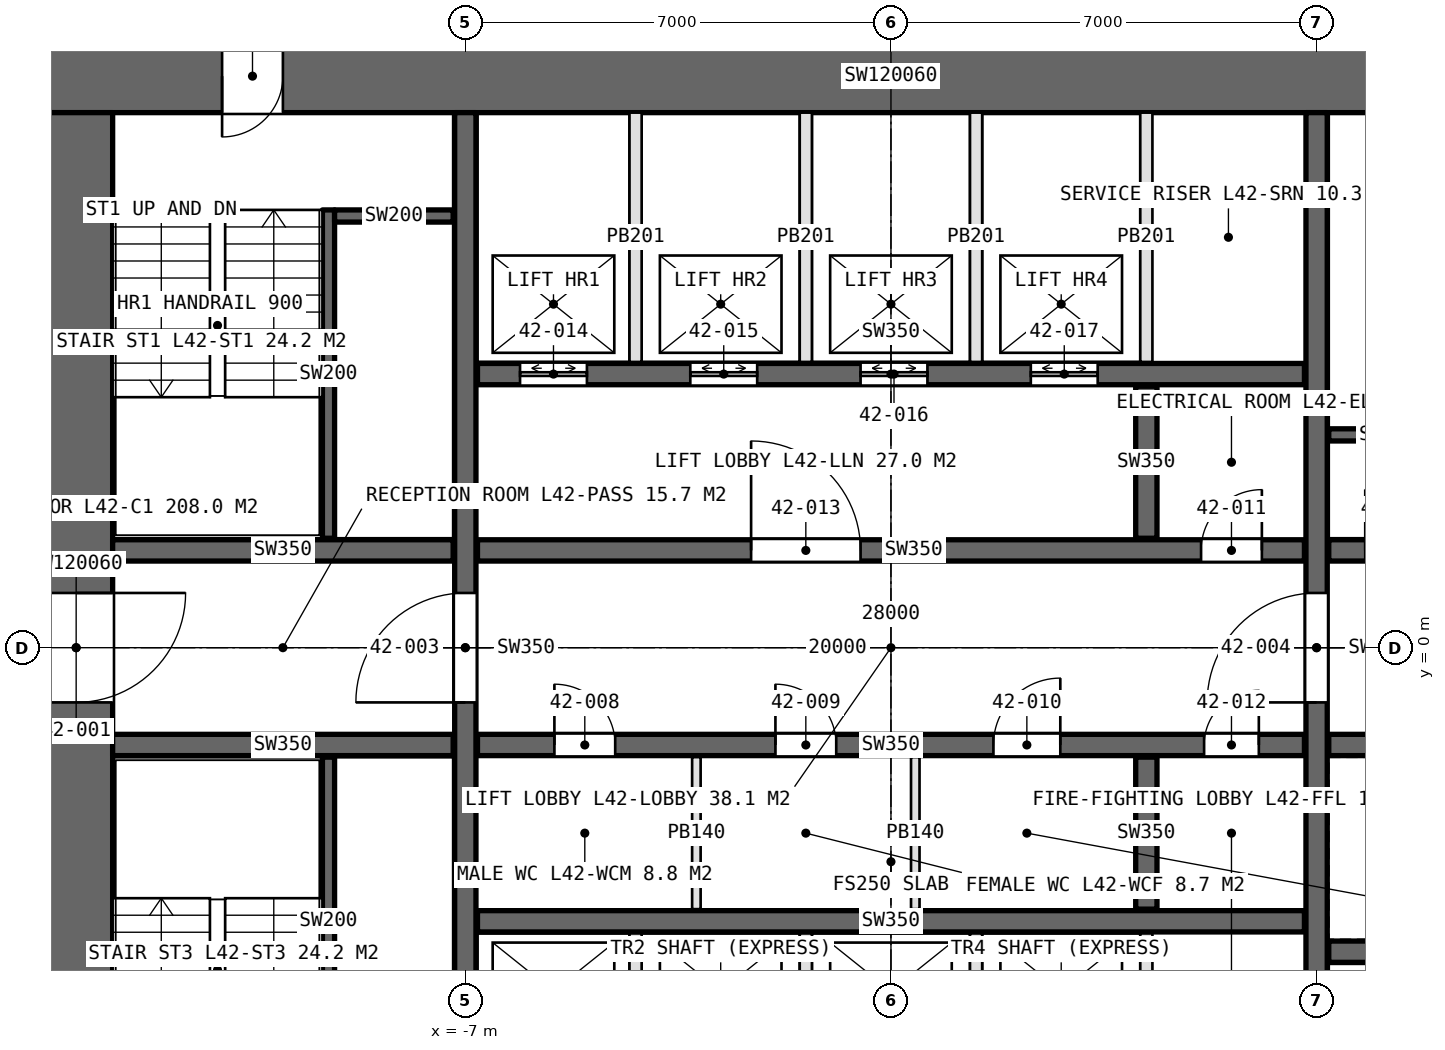
"""IFC4 building model, lengths in metres.
Left out: names, types, materials, properties, quantities, classifications, styles, units other than length and angle.
Written with IfcOpenShell. Run it as: python <this file> out.ifc"""

import sys

from ifc_helpers import new_model, si_unit, direction, frame, frame_2d, origin, place, context, subcontext, project, spatial, rectangle, extrude, element, fill, save


model = new_model("IFC4")
c1 = context("Model", 3, precision=1e-05, world=origin(), true_north=direction((0.0, 1.0)))
c2 = subcontext(c1, "Body", "Model", "MODEL_VIEW")
j1 = project(units=[si_unit("LENGTHUNIT", "METRE"), si_unit("PLANEANGLEUNIT", "RADIAN")], contexts=[c1])
p1 = place(None, origin())
s1 = spatial("IfcSite", under=j1, at=p1, CompositionType="ELEMENT")
p2 = place(p1, origin())
s2 = spatial("IfcBuilding", under=s1, at=p2, CompositionType="ELEMENT")
p3 = place(p2, frame((0.0, 0.0, 194.8)))
s3 = spatial("IfcBuildingStorey", under=s2, at=p3, CompositionType="ELEMENT", Elevation=194.8)
p4 = place(p3, frame((14.0, 9.4, 0.0), z_axis=(0.0, 0.0, 1.0), x_axis=(-1.0, 0.0, 0.0)))
e1 = element("IfcWall", 1, at=p4, inside=s3, PredefinedType="SHEAR", context=c2, shape_type="SweptSolid", body=[
    extrude(rectangle(XDim=28.0, YDim=1.2, at=frame_2d((14.0, 0.0))), origin(), (0.0, 0.0, 1.0), 4.2),
])
p5 = place(p4, frame((24.0, 0.0, 0.0)))
e2 = element("IfcOpeningElement", 2, at=p5, cuts=e1, PredefinedType="OPENING", context=c2, shape_type="SweptSolid", body=[
    extrude(rectangle(XDim=1.0, YDim=2.4, at=frame_2d((0.5, 1.2))), frame((0.0, 0.61, 0.0), z_axis=(0.0, -1.0, 0.0), x_axis=(1.0, 0.0, 0.0)), (0.0, 0.0, 1.0), 1.22),
])
p6 = place(p3, frame((-13.4, 8.8, 0.0), z_axis=(0.0, 0.0, 1.0), x_axis=(0.0, -1.0, 0.0)))
e3 = element("IfcWall", 3, at=p6, inside=s3, PredefinedType="SHEAR", context=c2, shape_type="SweptSolid", body=[
    extrude(rectangle(XDim=17.6, YDim=1.2, at=frame_2d((8.8, 0.0))), origin(), (0.0, 0.0, 1.0), 4.2),
])
p7 = place(p6, frame((7.9, 0.0, 0.0)))
e4 = element("IfcOpeningElement", 4, at=p7, cuts=e3, PredefinedType="OPENING", context=c2, shape_type="SweptSolid", body=[
    extrude(rectangle(XDim=1.8, YDim=2.4, at=frame_2d((0.9, 1.2))), frame((0.0, 0.61, 0.0), z_axis=(0.0, -1.0, 0.0), x_axis=(1.0, 0.0, 0.0)), (0.0, 0.0, 1.0), 1.22),
])
p8 = place(p6, frame((16.5, 0.0, 0.0)))
e5 = element("IfcOpeningElement", 5, at=p8, cuts=e3, PredefinedType="OPENING", context=c2, shape_type="SweptSolid", body=[
    extrude(rectangle(XDim=1.0, YDim=2.4, at=frame_2d((0.5, 1.2))), frame((0.0, 0.61, 0.0), z_axis=(0.0, -1.0, 0.0), x_axis=(1.0, 0.0, 0.0)), (0.0, 0.0, 1.0), 1.22),
])
p9 = place(p3, frame((-7.0, -8.8, 0.0), z_axis=(0.0, 0.0, 1.0), x_axis=(0.0, 1.0, 0.0)))
e6 = element("IfcWall", 6, at=p9, inside=s3, PredefinedType="SHEAR", context=c2, shape_type="SweptSolid", body=[
    extrude(rectangle(XDim=17.6, YDim=0.35, at=frame_2d((8.8, 0.0))), origin(), (0.0, 0.0, 1.0), 4.2),
])
p10 = place(p9, frame((7.9, 0.0, 0.0)))
e7 = element("IfcOpeningElement", 7, at=p10, cuts=e6, PredefinedType="OPENING", context=c2, shape_type="SweptSolid", body=[
    extrude(rectangle(XDim=1.8, YDim=2.4, at=frame_2d((0.9, 1.2))), frame((0.0, 0.185, 0.0), z_axis=(0.0, -1.0, 0.0), x_axis=(1.0, 0.0, 0.0)), (0.0, 0.0, 1.0), 0.37),
])
p11 = place(p3, frame((7.0, -8.8, 0.0), z_axis=(0.0, 0.0, 1.0), x_axis=(0.0, 1.0, 0.0)))
e8 = element("IfcWall", 8, at=p11, inside=s3, PredefinedType="SHEAR", context=c2, shape_type="SweptSolid", body=[
    extrude(rectangle(XDim=17.6, YDim=0.35, at=frame_2d((8.8, 0.0))), origin(), (0.0, 0.0, 1.0), 4.2),
])
p12 = place(p11, frame((7.9, 0.0, 0.0)))
e9 = element("IfcOpeningElement", 9, at=p12, cuts=e8, PredefinedType="OPENING", context=c2, shape_type="SweptSolid", body=[
    extrude(rectangle(XDim=1.8, YDim=2.4, at=frame_2d((0.9, 1.2))), frame((0.0, 0.185, 0.0), z_axis=(0.0, -1.0, 0.0), x_axis=(1.0, 0.0, 0.0)), (0.0, 0.0, 1.0), 0.37),
])
p13 = place(p3, frame((-6.8, 1.6, 0.0), z_axis=(0.0, 0.0, 1.0), x_axis=(1.0, 0.0, 0.0)))
e10 = element("IfcWall", 10, at=p13, inside=s3, PredefinedType="SHEAR", context=c2, shape_type="SweptSolid", body=[
    extrude(rectangle(XDim=13.6, YDim=0.35, at=frame_2d((6.8, 0.0))), origin(), (0.0, 0.0, 1.0), 4.2),
])
p14 = place(p13, frame((11.9, 0.0, 0.0)))
e11 = element("IfcOpeningElement", 11, at=p14, cuts=e10, PredefinedType="OPENING", context=c2, shape_type="SweptSolid", body=[
    extrude(rectangle(XDim=1.0, YDim=2.4, at=frame_2d((0.5, 1.2))), frame((0.0, 0.185, 0.0), z_axis=(0.0, -1.0, 0.0), x_axis=(1.0, 0.0, 0.0)), (0.0, 0.0, 1.0), 0.37),
])
p15 = place(p13, frame((4.5, 0.0, 0.0)))
e12 = element("IfcOpeningElement", 12, at=p15, cuts=e10, PredefinedType="OPENING", context=c2, shape_type="SweptSolid", body=[
    extrude(rectangle(XDim=1.8, YDim=2.4, at=frame_2d((0.9, 1.2))), frame((0.0, 0.185, 0.0), z_axis=(0.0, -1.0, 0.0), x_axis=(1.0, 0.0, 0.0)), (0.0, 0.0, 1.0), 0.37),
])
p16 = place(p3, frame((-6.8, -1.6, 0.0), z_axis=(0.0, 0.0, 1.0), x_axis=(1.0, 0.0, 0.0)))
e13 = element("IfcWall", 13, at=p16, inside=s3, PredefinedType="SHEAR", context=c2, shape_type="SweptSolid", body=[
    extrude(rectangle(XDim=13.6, YDim=0.35, at=frame_2d((6.8, 0.0))), origin(), (0.0, 0.0, 1.0), 4.2),
])
p17 = place(p16, frame((1.265, 0.0, 0.0)))
e14 = element("IfcOpeningElement", 14, at=p17, cuts=e13, PredefinedType="OPENING", context=c2, shape_type="SweptSolid", body=[
    extrude(rectangle(XDim=1.0, YDim=2.4, at=frame_2d((0.5, 1.2))), frame((0.0, 0.185, 0.0), z_axis=(0.0, -1.0, 0.0), x_axis=(1.0, 0.0, 0.0)), (0.0, 0.0, 1.0), 0.37),
])
p18 = place(p16, frame((4.9, 0.0, 0.0)))
e15 = element("IfcOpeningElement", 15, at=p18, cuts=e13, PredefinedType="OPENING", context=c2, shape_type="SweptSolid", body=[
    extrude(rectangle(XDim=1.0, YDim=2.4, at=frame_2d((0.5, 1.2))), frame((0.0, 0.185, 0.0), z_axis=(0.0, -1.0, 0.0), x_axis=(1.0, 0.0, 0.0)), (0.0, 0.0, 1.0), 0.37),
])
p19 = place(p16, frame((8.485, 0.0, 0.0)))
e16 = element("IfcOpeningElement", 16, at=p19, cuts=e13, PredefinedType="OPENING", context=c2, shape_type="SweptSolid", body=[
    extrude(rectangle(XDim=1.1, YDim=2.4, at=frame_2d((0.55, 1.2))), frame((0.0, 0.185, 0.0), z_axis=(0.0, -1.0, 0.0), x_axis=(1.0, 0.0, 0.0)), (0.0, 0.0, 1.0), 0.37),
])
p20 = place(p16, frame((11.95, 0.0, 0.0)))
e17 = element("IfcOpeningElement", 17, at=p20, cuts=e13, PredefinedType="OPENING", context=c2, shape_type="SweptSolid", body=[
    extrude(rectangle(XDim=0.9, YDim=2.4, at=frame_2d((0.45, 1.2))), frame((0.0, 0.185, 0.0), z_axis=(0.0, -1.0, 0.0), x_axis=(1.0, 0.0, 0.0)), (0.0, 0.0, 1.0), 0.37),
])
p21 = place(p3, frame((-6.8, 4.5, 0.0), z_axis=(0.0, 0.0, 1.0), x_axis=(1.0, 0.0, 0.0)))
e18 = element("IfcWall", 18, at=p21, inside=s3, PredefinedType="SHEAR", context=c2, shape_type="SweptSolid", body=[
    extrude(rectangle(XDim=13.6, YDim=0.35, at=frame_2d((6.8, 0.0))), origin(), (0.0, 0.0, 1.0), 4.2),
])
p22 = place(p21, frame((0.7, 0.0, 0.0)))
e19 = element("IfcOpeningElement", 19, at=p22, cuts=e18, PredefinedType="OPENING", context=c2, shape_type="SweptSolid", body=[
    extrude(rectangle(XDim=1.1, YDim=2.4, at=frame_2d((0.55, 1.2))), frame((0.0, 0.185, 0.0), z_axis=(0.0, -1.0, 0.0), x_axis=(1.0, 0.0, 0.0)), (0.0, 0.0, 1.0), 0.37),
])
p23 = place(p21, frame((3.5, 0.0, 0.0)))
e20 = element("IfcOpeningElement", 20, at=p23, cuts=e18, PredefinedType="OPENING", context=c2, shape_type="SweptSolid", body=[
    extrude(rectangle(XDim=1.1, YDim=2.4, at=frame_2d((0.55, 1.2))), frame((0.0, 0.185, 0.0), z_axis=(0.0, -1.0, 0.0), x_axis=(1.0, 0.0, 0.0)), (0.0, 0.0, 1.0), 0.37),
])
p24 = place(p21, frame((6.3, 0.0, 0.0)))
e21 = element("IfcOpeningElement", 21, at=p24, cuts=e18, PredefinedType="OPENING", context=c2, shape_type="SweptSolid", body=[
    extrude(rectangle(XDim=1.1, YDim=2.4, at=frame_2d((0.55, 1.2))), frame((0.0, 0.185, 0.0), z_axis=(0.0, -1.0, 0.0), x_axis=(1.0, 0.0, 0.0)), (0.0, 0.0, 1.0), 0.37),
])
p25 = place(p21, frame((9.1, 0.0, 0.0)))
e22 = element("IfcOpeningElement", 22, at=p25, cuts=e18, PredefinedType="OPENING", context=c2, shape_type="SweptSolid", body=[
    extrude(rectangle(XDim=1.1, YDim=2.4, at=frame_2d((0.55, 1.2))), frame((0.0, 0.185, 0.0), z_axis=(0.0, -1.0, 0.0), x_axis=(1.0, 0.0, 0.0)), (0.0, 0.0, 1.0), 0.37),
])
p26 = place(p3, frame((-6.8, -4.5, 0.0), z_axis=(0.0, 0.0, 1.0), x_axis=(1.0, 0.0, 0.0)))
e23 = element("IfcWall", 23, at=p26, inside=s3, PredefinedType="SHEAR", context=c2, shape_type="SweptSolid", body=[
    extrude(rectangle(XDim=13.6, YDim=0.35, at=frame_2d((6.8, 0.0))), origin(), (0.0, 0.0, 1.0), 4.2),
])
for number, where, z_axis, x_axis in (
    (24, (-12.8, 1.6, 0.0), (0.0, 0.0, 1.0), (1.0, 0.0, 0.0)),
    (25, (-12.8, -1.6, 0.0), (0.0, 0.0, 1.0), (1.0, 0.0, 0.0)),
):
    element("IfcWall", number, at=place(p3, frame(where, z_axis=z_axis, x_axis=x_axis)), inside=s3, PredefinedType="SHEAR", context=c2, shape_type="SweptSolid", body=[
        extrude(rectangle(XDim=5.6, YDim=0.35, at=frame_2d((2.8, 0.0))), origin(), (0.0, 0.0, 1.0), 4.2),
    ])
p27 = place(p3, frame((7.2, 1.6, 0.0), z_axis=(0.0, 0.0, 1.0), x_axis=(1.0, 0.0, 0.0)))
e26 = element("IfcWall", 26, at=p27, inside=s3, PredefinedType="SHEAR", context=c2, shape_type="SweptSolid", body=[
    extrude(rectangle(XDim=5.6, YDim=0.35, at=frame_2d((2.8, 0.0))), origin(), (0.0, 0.0, 1.0), 4.2),
])
p28 = place(p27, frame((0.6, 0.0, 0.0)))
e27 = element("IfcOpeningElement", 27, at=p28, cuts=e26, PredefinedType="OPENING", context=c2, shape_type="SweptSolid", body=[
    extrude(rectangle(XDim=1.0, YDim=2.4, at=frame_2d((0.5, 1.2))), frame((0.0, 0.185, 0.0), z_axis=(0.0, -1.0, 0.0), x_axis=(1.0, 0.0, 0.0)), (0.0, 0.0, 1.0), 0.37),
])
p29 = place(p3, frame((7.2, -1.6, 0.0), z_axis=(0.0, 0.0, 1.0), x_axis=(1.0, 0.0, 0.0)))
e28 = element("IfcWall", 28, at=p29, inside=s3, PredefinedType="SHEAR", context=c2, shape_type="SweptSolid", body=[
    extrude(rectangle(XDim=5.6, YDim=0.35, at=frame_2d((2.8, 0.0))), origin(), (0.0, 0.0, 1.0), 4.2),
])
p30 = place(p29, frame((0.9, 0.0, 0.0)))
e29 = element("IfcOpeningElement", 29, at=p30, cuts=e28, PredefinedType="OPENING", context=c2, shape_type="SweptSolid", body=[
    extrude(rectangle(XDim=1.3, YDim=2.4, at=frame_2d((0.65, 1.2))), frame((0.0, 0.185, 0.0), z_axis=(0.0, -1.0, 0.0), x_axis=(1.0, 0.0, 0.0)), (0.0, 0.0, 1.0), 0.37),
])
p31 = place(p29, frame((3.9, 0.0, 0.0)))
e30 = element("IfcOpeningElement", 30, at=p31, cuts=e28, PredefinedType="OPENING", context=c2, shape_type="SweptSolid", body=[
    extrude(rectangle(XDim=1.3, YDim=2.4, at=frame_2d((0.65, 1.2))), frame((0.0, 0.185, 0.0), z_axis=(0.0, -1.0, 0.0), x_axis=(1.0, 0.0, 0.0)), (0.0, 0.0, 1.0), 0.37),
])
p32 = place(p3, frame((7.2, -5.0, 0.0), z_axis=(0.0, 0.0, 1.0), x_axis=(1.0, 0.0, 0.0)))
e31 = element("IfcWall", 31, at=p32, inside=s3, PredefinedType="SHEAR", context=c2, shape_type="SweptSolid", body=[
    extrude(rectangle(XDim=5.6, YDim=0.35, at=frame_2d((2.8, 0.0))), origin(), (0.0, 0.0, 1.0), 4.2),
])
for number, where, z_axis, x_axis in (
    (32, (4.2, 1.8, 0.0), (0.0, 0.0, 1.0), (0.0, 1.0, 0.0)),
    (33, (4.2, -4.3, 0.0), (0.0, 0.0, 1.0), (0.0, 1.0, 0.0)),
):
    element("IfcWall", number, at=place(p3, frame(where, z_axis=z_axis, x_axis=x_axis)), inside=s3, PredefinedType="SHEAR", context=c2, shape_type="SweptSolid", body=[
        extrude(rectangle(XDim=2.5, YDim=0.35, at=frame_2d((1.25, 0.0))), origin(), (0.0, 0.0, 1.0), 4.2),
    ])
for number, where, z_axis, x_axis in (
    (34, (-3.2, -1.8, 0.0), (0.0, 0.0, 1.0), (0.0, -1.0, 0.0)),
    (35, (0.4, -1.8, 0.0), (0.0, 0.0, 1.0), (0.0, -1.0, 0.0)),
):
    element("IfcWall", number, at=place(p3, frame(where, z_axis=z_axis, x_axis=x_axis)), inside=s3, PredefinedType="PARTITIONING", context=c2, shape_type="SweptSolid", body=[
        extrude(rectangle(XDim=2.5, YDim=0.14, at=frame_2d((1.25, 0.0))), origin(), (0.0, 0.0, 1.0), 3.95),
    ])
for number, where, z_axis, x_axis in (
    (36, (-4.2, 4.7, 0.0), (0.0, 0.0, 1.0), (0.0, 1.0, 0.0)),
    (37, (-1.4, 4.7, 0.0), (0.0, 0.0, 1.0), (0.0, 1.0, 0.0)),
    (38, (1.4, 4.7, 0.0), (0.0, 0.0, 1.0), (0.0, 1.0, 0.0)),
    (39, (4.2, 4.7, 0.0), (0.0, 0.0, 1.0), (0.0, 1.0, 0.0)),
    (40, (-4.2, -4.7, 0.0), (0.0, 0.0, 1.0), (0.0, -1.0, 0.0)),
    (41, (-1.4, -4.7, 0.0), (0.0, 0.0, 1.0), (0.0, -1.0, 0.0)),
    (42, (1.4, -4.7, 0.0), (0.0, 0.0, 1.0), (0.0, -1.0, 0.0)),
    (43, (4.2, -4.7, 0.0), (0.0, 0.0, 1.0), (0.0, -1.0, 0.0)),
):
    element("IfcWall", number, at=place(p3, frame(where, z_axis=z_axis, x_axis=x_axis)), inside=s3, PredefinedType="PARTITIONING", context=c2, shape_type="SweptSolid", body=[
        extrude(rectangle(XDim=4.1, YDim=0.2, at=frame_2d((2.05, 0.0))), origin(), (0.0, 0.0, 1.0), 4.2),
    ])
p33 = place(p3, frame((-9.25, 7.2, 0.0), z_axis=(0.0, 0.0, 1.0), x_axis=(0.0, -1.0, 0.0)))
e44 = element("IfcWall", 44, at=p33, inside=s3, PredefinedType="SOLIDWALL", context=c2, shape_type="SweptSolid", body=[
    extrude(rectangle(XDim=5.4, YDim=0.2, at=frame_2d((2.7, 0.0))), origin(), (0.0, 0.0, 1.0), 4.2),
])
p34 = place(p3, frame((-9.15, 7.1, 0.0), z_axis=(0.0, 0.0, 1.0), x_axis=(1.0, 0.0, 0.0)))
e45 = element("IfcWall", 45, at=p34, inside=s3, PredefinedType="SOLIDWALL", context=c2, shape_type="SweptSolid", body=[
    extrude(rectangle(XDim=1.95, YDim=0.2, at=frame_2d((0.975, 0.0))), origin(), (0.0, 0.0, 1.0), 4.2),
])
p35 = place(p3, frame((-9.25, -7.2, 0.0), z_axis=(0.0, 0.0, 1.0), x_axis=(0.0, 1.0, 0.0)))
e46 = element("IfcWall", 46, at=p35, inside=s3, PredefinedType="SOLIDWALL", context=c2, shape_type="SweptSolid", body=[
    extrude(rectangle(XDim=5.4, YDim=0.2, at=frame_2d((2.7, 0.0))), origin(), (0.0, 0.0, 1.0), 4.2),
])
p36 = place(p3, frame((9.15, 3.5, 0.0), z_axis=(0.0, 0.0, 1.0), x_axis=(-1.0, 0.0, 0.0)))
e47 = element("IfcWall", 47, at=p36, inside=s3, PredefinedType="SOLIDWALL", context=c2, shape_type="SweptSolid", body=[
    extrude(rectangle(XDim=1.95, YDim=0.2, at=frame_2d((0.975, 0.0))), origin(), (0.0, 0.0, 1.0), 4.2),
])
p37 = place(p7, origin())
e48 = element("IfcDoor", 48, at=p37, inside=s3, OperationType="DOUBLE_DOOR_SINGLE_SWING", PredefinedType="DOOR", context=c2, shape_type="SweptSolid", body=[
    extrude(rectangle(XDim=1.8, YDim=2.4, at=frame_2d((0.9, 1.2))), frame((0.0, 0.025, 0.0), z_axis=(0.0, -1.0, 0.0), x_axis=(1.0, 0.0, 0.0)), (0.0, 0.0, 1.0), 0.05),
])
fill(e4, e48)
p38 = place(p10, origin())
e49 = element("IfcDoor", 49, at=p38, inside=s3, OperationType="DOUBLE_DOOR_SINGLE_SWING", PredefinedType="DOOR", context=c2, shape_type="SweptSolid", body=[
    extrude(rectangle(XDim=1.8, YDim=2.4, at=frame_2d((0.9, 1.2))), frame((0.0, 0.025, 0.0), z_axis=(0.0, -1.0, 0.0), x_axis=(1.0, 0.0, 0.0)), (0.0, 0.0, 1.0), 0.05),
])
fill(e7, e49)
p39 = place(p12, origin())
e50 = element("IfcDoor", 50, at=p39, inside=s3, OperationType="DOUBLE_DOOR_SINGLE_SWING", PredefinedType="DOOR", context=c2, shape_type="SweptSolid", body=[
    extrude(rectangle(XDim=1.8, YDim=2.4, at=frame_2d((0.9, 1.2))), frame((0.0, 0.025, 0.0), z_axis=(0.0, -1.0, 0.0), x_axis=(1.0, 0.0, 0.0)), (0.0, 0.0, 1.0), 0.05),
])
fill(e9, e50)
p40 = place(p5, origin())
e51 = element("IfcDoor", 51, at=p40, inside=s3, OperationType="SINGLE_SWING_RIGHT", PredefinedType="DOOR", context=c2, shape_type="SweptSolid", body=[
    extrude(rectangle(XDim=1.0, YDim=2.4, at=frame_2d((0.5, 1.2))), frame((0.0, 0.025, 0.0), z_axis=(0.0, -1.0, 0.0), x_axis=(1.0, 0.0, 0.0)), (0.0, 0.0, 1.0), 0.05),
])
fill(e2, e51)
p41 = place(p17, origin())
e52 = element("IfcDoor", 52, at=p41, inside=s3, OperationType="SINGLE_SWING_LEFT", PredefinedType="DOOR", context=c2, shape_type="SweptSolid", body=[
    extrude(rectangle(XDim=1.0, YDim=2.4, at=frame_2d((0.5, 1.2))), frame((0.0, 0.025, 0.0), z_axis=(0.0, -1.0, 0.0), x_axis=(1.0, 0.0, 0.0)), (0.0, 0.0, 1.0), 0.05),
])
fill(e14, e52)
p42 = place(p18, origin())
e53 = element("IfcDoor", 53, at=p42, inside=s3, OperationType="SINGLE_SWING_LEFT", PredefinedType="DOOR", context=c2, shape_type="SweptSolid", body=[
    extrude(rectangle(XDim=1.0, YDim=2.4, at=frame_2d((0.5, 1.2))), frame((0.0, 0.025, 0.0), z_axis=(0.0, -1.0, 0.0), x_axis=(1.0, 0.0, 0.0)), (0.0, 0.0, 1.0), 0.05),
])
fill(e15, e53)
p43 = place(p19, origin())
e54 = element("IfcDoor", 54, at=p43, inside=s3, OperationType="SINGLE_SWING_RIGHT", PredefinedType="DOOR", context=c2, shape_type="SweptSolid", body=[
    extrude(rectangle(XDim=1.1, YDim=2.4, at=frame_2d((0.55, 1.2))), frame((0.0, 0.025, 0.0), z_axis=(0.0, -1.0, 0.0), x_axis=(1.0, 0.0, 0.0)), (0.0, 0.0, 1.0), 0.05),
])
fill(e16, e54)
p44 = place(p14, origin())
e55 = element("IfcDoor", 55, at=p44, inside=s3, OperationType="SINGLE_SWING_RIGHT", PredefinedType="DOOR", context=c2, shape_type="SweptSolid", body=[
    extrude(rectangle(XDim=1.0, YDim=2.4, at=frame_2d((0.5, 1.2))), frame((0.0, 0.025, 0.0), z_axis=(0.0, -1.0, 0.0), x_axis=(1.0, 0.0, 0.0)), (0.0, 0.0, 1.0), 0.05),
])
fill(e11, e55)
p45 = place(p20, origin())
e56 = element("IfcDoor", 56, at=p45, inside=s3, OperationType="SINGLE_SWING_RIGHT", PredefinedType="DOOR", context=c2, shape_type="SweptSolid", body=[
    extrude(rectangle(XDim=0.9, YDim=2.4, at=frame_2d((0.45, 1.2))), frame((0.0, 0.025, 0.0), z_axis=(0.0, -1.0, 0.0), x_axis=(1.0, 0.0, 0.0)), (0.0, 0.0, 1.0), 0.05),
])
fill(e17, e56)
p46 = place(p15, origin())
e57 = element("IfcDoor", 57, at=p46, inside=s3, OperationType="DOUBLE_DOOR_SINGLE_SWING", PredefinedType="DOOR", context=c2, shape_type="SweptSolid", body=[
    extrude(rectangle(XDim=1.8, YDim=2.4, at=frame_2d((0.9, 1.2))), frame((0.0, 0.025, 0.0), z_axis=(0.0, -1.0, 0.0), x_axis=(1.0, 0.0, 0.0)), (0.0, 0.0, 1.0), 0.05),
])
fill(e12, e57)
p47 = place(p22, origin())
e58 = element("IfcDoor", 58, at=p47, inside=s3, OperationType="DOUBLE_DOOR_SLIDING", PredefinedType="DOOR", context=c2, shape_type="SweptSolid", body=[
    extrude(rectangle(XDim=1.1, YDim=2.4, at=frame_2d((0.55, 1.2))), frame((0.0, 0.025, 0.0), z_axis=(0.0, -1.0, 0.0), x_axis=(1.0, 0.0, 0.0)), (0.0, 0.0, 1.0), 0.05),
])
fill(e19, e58)
p48 = place(p23, origin())
e59 = element("IfcDoor", 59, at=p48, inside=s3, OperationType="DOUBLE_DOOR_SLIDING", PredefinedType="DOOR", context=c2, shape_type="SweptSolid", body=[
    extrude(rectangle(XDim=1.1, YDim=2.4, at=frame_2d((0.55, 1.2))), frame((0.0, 0.025, 0.0), z_axis=(0.0, -1.0, 0.0), x_axis=(1.0, 0.0, 0.0)), (0.0, 0.0, 1.0), 0.05),
])
fill(e20, e59)
p49 = place(p24, origin())
e60 = element("IfcDoor", 60, at=p49, inside=s3, OperationType="DOUBLE_DOOR_SLIDING", PredefinedType="DOOR", context=c2, shape_type="SweptSolid", body=[
    extrude(rectangle(XDim=1.1, YDim=2.4, at=frame_2d((0.55, 1.2))), frame((0.0, 0.025, 0.0), z_axis=(0.0, -1.0, 0.0), x_axis=(1.0, 0.0, 0.0)), (0.0, 0.0, 1.0), 0.05),
])
fill(e21, e60)
p50 = place(p25, origin())
e61 = element("IfcDoor", 61, at=p50, inside=s3, OperationType="DOUBLE_DOOR_SLIDING", PredefinedType="DOOR", context=c2, shape_type="SweptSolid", body=[
    extrude(rectangle(XDim=1.1, YDim=2.4, at=frame_2d((0.55, 1.2))), frame((0.0, 0.025, 0.0), z_axis=(0.0, -1.0, 0.0), x_axis=(1.0, 0.0, 0.0)), (0.0, 0.0, 1.0), 0.05),
])
fill(e22, e61)
save(model, sys.argv[1])
